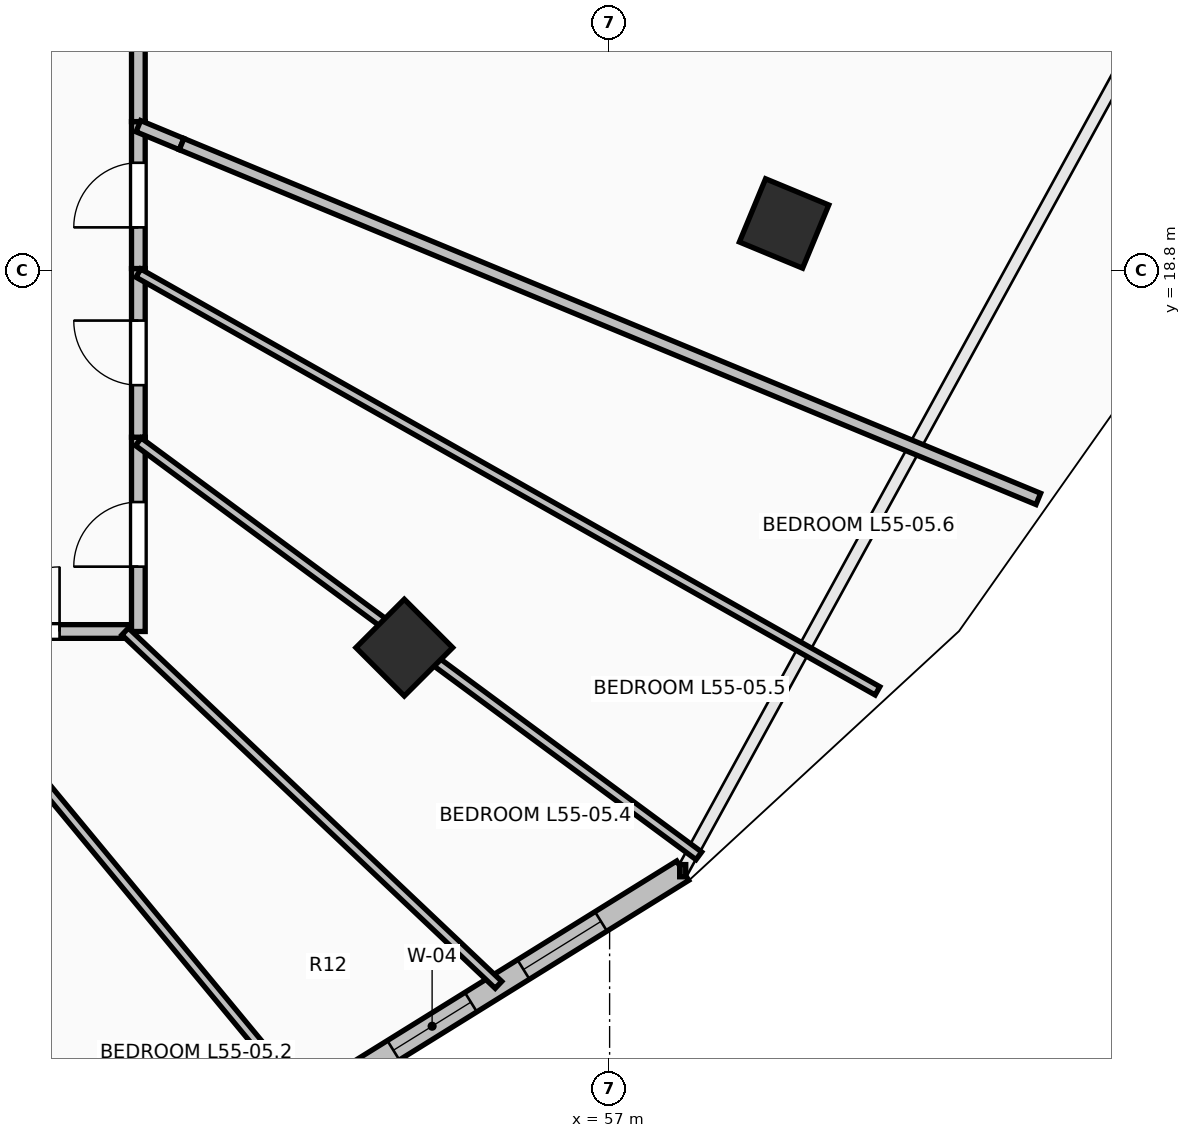
"""IFC4 building model, lengths in metres.
Left out: names, types, materials, properties, quantities, classifications, styles, units other than length and angle.
Written with IfcOpenShell. Run it as: python <this file> out.ifc"""

import sys

from ifc_helpers import new_model, si_unit, direction, frame, frame_2d, origin, origin_2d, place, context, subcontext, project, spatial, rectangle, extrude, element, fill, save


model = new_model("IFC4")
c1 = context("Model", 3, precision=1e-05, world=origin(), true_north=direction((0.0, 1.0)))
c2 = subcontext(c1, "Body", "Model", "MODEL_VIEW")
j1 = project(units=[si_unit("LENGTHUNIT", "METRE"), si_unit("PLANEANGLEUNIT", "RADIAN")], contexts=[c1])
p1 = place(None, origin())
s1 = spatial("IfcSite", under=j1, at=p1, CompositionType="ELEMENT")
p2 = place(p1, origin())
s2 = spatial("IfcBuilding", under=s1, at=p2, CompositionType="ELEMENT")
p3 = place(p2, frame((0.0, 0.0, 203.65)))
s3 = spatial("IfcBuildingStorey", under=s2, at=p3, CompositionType="ELEMENT", Elevation=203.65)
for number, where, z_axis, x_axis in (
    (1, (54.299, 13.838, 0.0), (0.0, 0.0, 1.0), (0.707, -0.707, 0.0)),
    (2, (59.295, 19.418, 0.0), (0.0, 0.0, 1.0), (0.924, -0.383, 0.0)),
):
    element("IfcColumn", number, at=place(p3, frame(where, z_axis=z_axis, x_axis=x_axis)), inside=s3, PredefinedType="COLUMN", context=c2, shape_type="SweptSolid", body=[
        extrude(rectangle(XDim=0.9, YDim=0.9, at=origin_2d()), origin(), (0.0, 0.0, 1.0), 3.55),
    ])
p4 = place(p3, frame((53.684, 8.248, 0.0), z_axis=(0.0, 0.0, 1.0), x_axis=(0.849647657754, 0.527350791858, 0.0)))
e3 = element("IfcWall", 3, at=p4, inside=s3, PredefinedType="STANDARD", context=c2, shape_type="SweptSolid", body=[
    extrude(rectangle(XDim=5.035, YDim=0.3, at=frame_2d((2.518, 0.0))), origin(), (0.0, 0.0, 1.0), 3.29),
])
p5 = place(p4, frame((0.555, 0.0, 0.85)))
e4 = element("IfcOpeningElement", 4, at=p5, cuts=e3, PredefinedType="OPENING", context=c2, shape_type="SweptSolid", body=[
    extrude(rectangle(XDim=1.2, YDim=1.95, at=frame_2d((0.6, 0.975))), frame((0.0, 0.165, 0.0), z_axis=(0.0, -1.0, 0.0), x_axis=(1.0, 0.0, 0.0)), (0.0, 0.0, 1.0), 0.33),
])
p6 = place(p4, frame((2.569, 0.0, 0.85)))
e5 = element("IfcOpeningElement", 5, at=p6, cuts=e3, PredefinedType="OPENING", context=c2, shape_type="SweptSolid", body=[
    extrude(rectangle(XDim=1.2, YDim=1.95, at=frame_2d((0.6, 0.975))), frame((0.0, 0.165, 0.0), z_axis=(0.0, -1.0, 0.0), x_axis=(1.0, 0.0, 0.0)), (0.0, 0.0, 1.0), 0.33),
])
p7 = place(p3, frame((47.964, 14.05, 0.0), z_axis=(0.0, 0.0, 1.0), x_axis=(1.0, 0.0, 0.0)))
e6 = element("IfcWall", 6, at=p7, inside=s3, PredefinedType="PARTITIONING", context=c2, shape_type="SweptSolid", body=[
    extrude(rectangle(XDim=2.749, YDim=0.18, at=frame_2d((1.375, 0.0))), origin(), (0.0, 0.0, 1.0), 2.482),
])
p8 = place(p7, frame((0.949, 0.0, 0.0)))
e7 = element("IfcOpeningElement", 7, at=p8, cuts=e6, PredefinedType="OPENING", context=c2, shape_type="SweptSolid", body=[
    extrude(rectangle(XDim=0.85, YDim=2.1, at=frame_2d((0.425, 1.05))), frame((0.0, 0.105, 0.0), z_axis=(0.0, -1.0, 0.0), x_axis=(1.0, 0.0, 0.0)), (0.0, 0.0, 1.0), 0.21),
])
p9 = place(p3, frame((50.8, 14.05, 0.0), z_axis=(0.0, 0.0, 1.0), x_axis=(0.0, 1.0, 0.0)))
e8 = element("IfcWall", 8, at=p9, inside=s3, PredefinedType="PARTITIONING", context=c2, shape_type="SweptSolid", body=[
    extrude(rectangle(XDim=2.556, YDim=0.18, at=frame_2d((1.278, 0.0))), origin(), (0.0, 0.0, 1.0), 2.482),
])
p10 = place(p9, frame((0.853, 0.0, 0.0)))
e9 = element("IfcOpeningElement", 9, at=p10, cuts=e8, PredefinedType="OPENING", context=c2, shape_type="SweptSolid", body=[
    extrude(rectangle(XDim=0.85, YDim=2.1, at=frame_2d((0.425, 1.05))), frame((0.0, 0.105, 0.0), z_axis=(0.0, -1.0, 0.0), x_axis=(1.0, 0.0, 0.0)), (0.0, 0.0, 1.0), 0.21),
])
p11 = place(p3, frame((50.8, 16.606, 0.0), z_axis=(0.0, 0.0, 1.0), x_axis=(0.0, 1.0, 0.0)))
e10 = element("IfcWall", 10, at=p11, inside=s3, PredefinedType="PARTITIONING", context=c2, shape_type="SweptSolid", body=[
    extrude(rectangle(XDim=2.219, YDim=0.18, at=frame_2d((1.109, 0.0))), origin(), (0.0, 0.0, 1.0), 2.936),
])
p12 = place(p11, frame((0.685, 0.0, 0.0)))
e11 = element("IfcOpeningElement", 11, at=p12, cuts=e10, PredefinedType="OPENING", context=c2, shape_type="SweptSolid", body=[
    extrude(rectangle(XDim=0.85, YDim=2.1, at=frame_2d((0.425, 1.05))), frame((0.0, 0.105, 0.0), z_axis=(0.0, -1.0, 0.0), x_axis=(1.0, 0.0, 0.0)), (0.0, 0.0, 1.0), 0.21),
])
p13 = place(p3, frame((50.8, 18.825, 0.0), z_axis=(0.0, 0.0, 1.0), x_axis=(0.0, 1.0, 0.0)))
e12 = element("IfcWall", 12, at=p13, inside=s3, PredefinedType="PARTITIONING", context=c2, shape_type="SweptSolid", body=[
    extrude(rectangle(XDim=1.933, YDim=0.18, at=frame_2d((0.967, 0.0))), origin(), (0.0, 0.0, 1.0), 3.29),
])
p14 = place(p13, frame((0.542, 0.0, 0.0)))
e13 = element("IfcOpeningElement", 13, at=p14, cuts=e12, PredefinedType="OPENING", context=c2, shape_type="SweptSolid", body=[
    extrude(rectangle(XDim=0.85, YDim=2.1, at=frame_2d((0.425, 1.05))), frame((0.0, 0.105, 0.0), z_axis=(0.0, -1.0, 0.0), x_axis=(1.0, 0.0, 0.0)), (0.0, 0.0, 1.0), 0.21),
])
p15 = place(p3, frame((50.8, 20.758, 0.0), z_axis=(0.0, 0.0, 1.0), x_axis=(0.0, 1.0, 0.0)))
e14 = element("IfcWall", 14, at=p15, inside=s3, PredefinedType="PARTITIONING", context=c2, shape_type="SweptSolid", body=[
    extrude(rectangle(XDim=3.792, YDim=0.18, at=frame_2d((1.896, 0.0))), origin(), (0.0, 0.0, 1.0), 3.29),
])
p16 = place(p3, frame((50.251, 6.862, 0.0), z_axis=(0.0, 0.0, 1.0), x_axis=(-0.539117012224, 0.842230875194, 0.0)))
e15 = element("IfcWall", 15, at=p16, inside=s3, PredefinedType="PARTITIONING", context=c2, shape_type="SweptSolid", body=[
    extrude(rectangle(XDim=8.534, YDim=0.125, at=frame_2d((4.267, 0.0))), origin(), (0.0, 0.0, 1.0), 2.482),
])
p17 = place(p3, frame((52.934, 7.948, 0.0), z_axis=(0.0, 0.0, 1.0), x_axis=(-0.637427009283, 0.77051074479, 0.0)))
e16 = element("IfcWall", 16, at=p17, inside=s3, PredefinedType="PARTITIONING", context=c2, shape_type="SweptSolid", body=[
    extrude(rectangle(XDim=7.919, YDim=0.125, at=frame_2d((3.96, 0.0))), origin(), (0.0, 0.0, 1.0), 2.482),
])
p18 = place(p3, frame((55.538, 9.401, 0.0), z_axis=(0.0, 0.0, 1.0), x_axis=(-0.726277952769, 0.687401145854, 0.0)))
e17 = element("IfcWall", 17, at=p18, inside=s3, PredefinedType="PARTITIONING", context=c2, shape_type="SweptSolid", body=[
    extrude(rectangle(XDim=6.763, YDim=0.125, at=frame_2d((3.382, 0.0))), origin(), (0.0, 0.0, 1.0), 2.824),
])
p19 = place(p3, frame((58.174, 11.099, 0.0), z_axis=(0.0, 0.0, 1.0), x_axis=(-0.804363169868, 0.594137939338, 0.0)))
e18 = element("IfcWall", 18, at=p19, inside=s3, PredefinedType="PARTITIONING", context=c2, shape_type="SweptSolid", body=[
    extrude(rectangle(XDim=9.167, YDim=0.125, at=frame_2d((4.584, 0.0))), origin(), (0.0, 0.0, 1.0), 2.482),
])
p20 = place(p3, frame((60.524, 13.269, 0.0), z_axis=(0.0, 0.0, 1.0), x_axis=(-0.870572608778, 0.49203997078, 0.0)))
e19 = element("IfcWall", 19, at=p20, inside=s3, PredefinedType="PARTITIONING", context=c2, shape_type="SweptSolid", body=[
    extrude(rectangle(XDim=11.169, YDim=0.125, at=frame_2d((5.585, 0.0))), origin(), (0.0, 0.0, 1.0), 2.824),
])
p21 = place(p3, frame((51.369, 20.462, 0.0), z_axis=(0.0, 0.0, 1.0), x_axis=(-0.923615496363, 0.383320251066, 0.0)))
e20 = element("IfcWall", 20, at=p21, inside=s3, PredefinedType="PARTITIONING", context=c2, shape_type="SweptSolid", body=[
    extrude(rectangle(XDim=0.616, YDim=0.16, at=frame_2d((0.308, 0.0))), origin(), (0.0, 0.0, 1.0), 2.936),
])
p22 = place(p3, frame((62.64, 15.794, 0.0), z_axis=(0.0, 0.0, 1.0), x_axis=(-0.923897809723, 0.382639304291, 0.0)))
e21 = element("IfcWall", 21, at=p22, inside=s3, PredefinedType="PARTITIONING", context=c2, shape_type="SweptSolid", body=[
    extrude(rectangle(XDim=12.199, YDim=0.16, at=frame_2d((6.1, 0.0))), origin(), (0.0, 0.0, 1.0), 2.824),
])
p23 = place(p5, origin())
e22 = element("IfcWindow", 22, at=p23, inside=s3, PartitioningType="SINGLE_PANEL", PredefinedType="WINDOW", context=c2, shape_type="SweptSolid", body=[
    extrude(rectangle(XDim=1.2, YDim=1.95, at=frame_2d((0.6, 0.975))), frame((0.0, 0.03, 0.0), z_axis=(0.0, -1.0, 0.0), x_axis=(1.0, 0.0, 0.0)), (0.0, 0.0, 1.0), 0.06),
])
fill(e4, e22)
p24 = place(p6, origin())
e23 = element("IfcWindow", 23, at=p24, inside=s3, PartitioningType="SINGLE_PANEL", PredefinedType="WINDOW", context=c2, shape_type="SweptSolid", body=[
    extrude(rectangle(XDim=1.2, YDim=1.95, at=frame_2d((0.6, 0.975))), frame((0.0, 0.03, 0.0), z_axis=(0.0, -1.0, 0.0), x_axis=(1.0, 0.0, 0.0)), (0.0, 0.0, 1.0), 0.06),
])
fill(e5, e23)
p25 = place(p8, origin())
e24 = element("IfcDoor", 24, at=p25, inside=s3, OperationType="SINGLE_SWING_RIGHT", PredefinedType="DOOR", context=c2, shape_type="SweptSolid", body=[
    extrude(rectangle(XDim=0.85, YDim=2.1, at=frame_2d((0.425, 1.05))), frame((0.0, 0.025, 0.0), z_axis=(0.0, -1.0, 0.0), x_axis=(1.0, 0.0, 0.0)), (0.0, 0.0, 1.0), 0.05),
])
fill(e7, e24)
p26 = place(p10, origin())
e25 = element("IfcDoor", 25, at=p26, inside=s3, OperationType="SINGLE_SWING_LEFT", PredefinedType="DOOR", context=c2, shape_type="SweptSolid", body=[
    extrude(rectangle(XDim=0.85, YDim=2.1, at=frame_2d((0.425, 1.05))), frame((0.0, 0.025, 0.0), z_axis=(0.0, -1.0, 0.0), x_axis=(1.0, 0.0, 0.0)), (0.0, 0.0, 1.0), 0.05),
])
fill(e9, e25)
p27 = place(p12, origin())
e26 = element("IfcDoor", 26, at=p27, inside=s3, OperationType="SINGLE_SWING_RIGHT", PredefinedType="DOOR", context=c2, shape_type="SweptSolid", body=[
    extrude(rectangle(XDim=0.85, YDim=2.1, at=frame_2d((0.425, 1.05))), frame((0.0, 0.025, 0.0), z_axis=(0.0, -1.0, 0.0), x_axis=(1.0, 0.0, 0.0)), (0.0, 0.0, 1.0), 0.05),
])
fill(e11, e26)
p28 = place(p14, origin())
e27 = element("IfcDoor", 27, at=p28, inside=s3, OperationType="SINGLE_SWING_LEFT", PredefinedType="DOOR", context=c2, shape_type="SweptSolid", body=[
    extrude(rectangle(XDim=0.85, YDim=2.1, at=frame_2d((0.425, 1.05))), frame((0.0, 0.025, 0.0), z_axis=(0.0, -1.0, 0.0), x_axis=(1.0, 0.0, 0.0)), (0.0, 0.0, 1.0), 0.05),
])
fill(e13, e27)
save(model, sys.argv[1])
